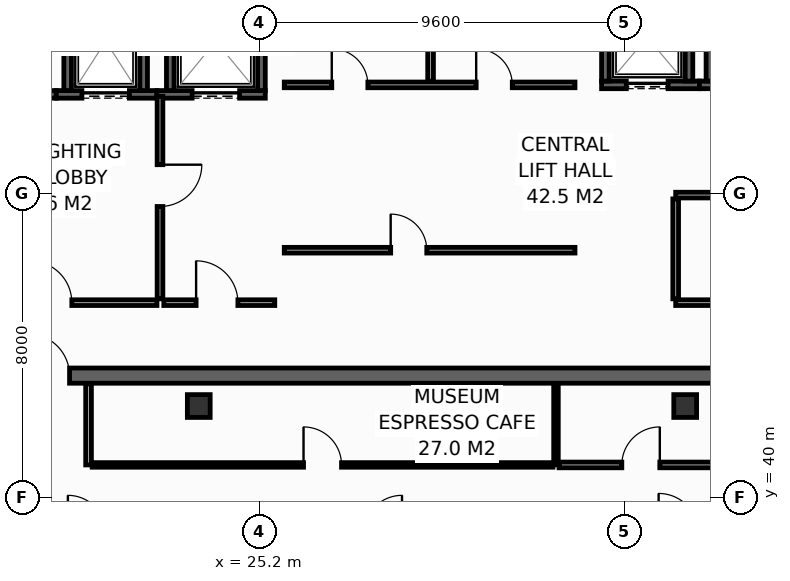
"""IFC4 building model, lengths in metres.
Left out: names, types, materials, properties, quantities, classifications, styles, units other than length and angle.
Written with IfcOpenShell. Run it as: python <this file> out.ifc"""

import sys

from ifc_helpers import new_model, si_unit, direction, frame, frame_2d, origin, origin_2d, place, context, subcontext, project, spatial, rectangle, hollow_rectangle, extrude, element, fill, save


model = new_model("IFC4")
c1 = context("Model", 3, precision=1e-05, world=origin(), true_north=direction((0.0, 1.0)))
c2 = subcontext(c1, "Body", "Model", "MODEL_VIEW")
j1 = project(units=[si_unit("LENGTHUNIT", "METRE"), si_unit("PLANEANGLEUNIT", "RADIAN")], contexts=[c1])
p1 = place(None, origin())
s1 = spatial("IfcSite", under=j1, at=p1, CompositionType="ELEMENT")
p2 = place(p1, origin())
s2 = spatial("IfcBuilding", under=s1, at=p2, CompositionType="ELEMENT")
p3 = place(p2, frame((0.0, 0.0, 261.0)))
s3 = spatial("IfcBuildingStorey", under=s2, at=p3, CompositionType="ELEMENT", Elevation=261.0)
p4 = place(p3, frame((13.7, 43.2, 0.0), z_axis=(0.0, 0.0, 1.0), x_axis=(1.0, 0.0, 0.0)))
e1 = element("IfcWall", 1, at=p4, inside=s3, PredefinedType="SHEAR", context=c2, shape_type="SweptSolid", body=[
    extrude(rectangle(XDim=32.5, YDim=0.4, at=frame_2d((16.25, 0.0))), origin(), (0.0, 0.0, 1.0), 3.55),
])
p5 = place(p4, frame((5.4, 0.0, 0.0)))
e2 = element("IfcOpeningElement", 2, at=p5, cuts=e1, PredefinedType="OPENING", context=c2, shape_type="SweptSolid", body=[
    extrude(rectangle(XDim=1.1, YDim=2.15, at=frame_2d((0.55, 1.075))), frame((0.0, 0.21, 0.0), z_axis=(0.0, -1.0, 0.0), x_axis=(1.0, 0.0, 0.0)), (0.0, 0.0, 1.0), 0.42),
])
p6 = place(p4, frame((25.6, 0.0, 0.0)))
e3 = element("IfcOpeningElement", 3, at=p6, cuts=e1, PredefinedType="OPENING", context=c2, shape_type="SweptSolid", body=[
    extrude(rectangle(XDim=1.1, YDim=2.15, at=frame_2d((0.55, 1.075))), frame((0.0, 0.21, 0.0), z_axis=(0.0, -1.0, 0.0), x_axis=(1.0, 0.0, 0.0)), (0.0, 0.0, 1.0), 0.42),
])
for number, where, z_axis, x_axis in (
    (4, (23.6, 42.4, 0.0), (0.0, 0.0, 1.0), (1.0, 0.0, 0.0)),
    (5, (36.4, 42.4, 0.0), (0.0, 0.0, 1.0), (1.0, 0.0, 0.0)),
):
    element("IfcColumn", number, at=place(p3, frame(where, z_axis=z_axis, x_axis=x_axis)), inside=s3, PredefinedType="COLUMN", context=c2, shape_type="SweptSolid", body=[
        extrude(hollow_rectangle(XDim=0.6, YDim=0.6, WallThickness=0.028, at=origin_2d()), origin(), (0.0, 0.0, 1.0), 3.8),
    ])
p7 = place(p3, frame((17.33, 50.6, 0.0), z_axis=(0.0, 0.0, 1.0), x_axis=(1.0, 0.0, 0.0)))
e6 = element("IfcWall", 6, at=p7, inside=s3, PredefinedType="SHEAR", context=c2, shape_type="SweptSolid", body=[
    extrude(rectangle(XDim=2.52, YDim=0.2, at=frame_2d((1.26, 0.0))), origin(), (0.0, 0.0, 1.0), 3.55),
])
p8 = place(p7, frame((0.595, 0.0, 0.0)))
e7 = element("IfcOpeningElement", 7, at=p8, cuts=e6, PredefinedType="OPENING", context=c2, shape_type="SweptSolid", body=[
    extrude(rectangle(XDim=1.25, YDim=2.3, at=frame_2d((0.625, 1.15))), frame((0.0, 0.11, 0.0), z_axis=(0.0, -1.0, 0.0), x_axis=(1.0, 0.0, 0.0)), (0.0, 0.0, 1.0), 0.22),
])
p9 = place(p3, frame((19.85, 50.6, 0.0), z_axis=(0.0, 0.0, 1.0), x_axis=(1.0, 0.0, 0.0)))
e8 = element("IfcWall", 8, at=p9, inside=s3, PredefinedType="SHEAR", context=c2, shape_type="SweptSolid", body=[
    extrude(rectangle(XDim=2.65, YDim=0.2, at=frame_2d((1.325, 0.0))), origin(), (0.0, 0.0, 1.0), 3.55),
])
p10 = place(p9, frame((0.675, 0.0, 0.0)))
e9 = element("IfcOpeningElement", 9, at=p10, cuts=e8, PredefinedType="OPENING", context=c2, shape_type="SweptSolid", body=[
    extrude(rectangle(XDim=1.25, YDim=2.3, at=frame_2d((0.625, 1.15))), frame((0.0, 0.11, 0.0), z_axis=(0.0, -1.0, 0.0), x_axis=(1.0, 0.0, 0.0)), (0.0, 0.0, 1.0), 0.22),
])
for number, where, z_axis, x_axis in (
    (10, (20.15, 50.7, 0.0), (0.0, 0.0, 1.0), (0.0, 1.0, 0.0)),
    (11, (22.15, 50.7, 0.0), (0.0, 0.0, 1.0), (0.0, 1.0, 0.0)),
):
    element("IfcWall", number, at=place(p3, frame(where, z_axis=z_axis, x_axis=x_axis)), inside=s3, PredefinedType="SHEAR", context=c2, shape_type="SweptSolid", body=[
        extrude(rectangle(XDim=2.6, YDim=0.2, at=frame_2d((1.3, 0.0))), origin(), (0.0, 0.0, 1.0), 3.55),
    ])
p11 = place(p3, frame((22.5, 50.6, 0.0), z_axis=(0.0, 0.0, 1.0), x_axis=(1.0, 0.0, 0.0)))
e12 = element("IfcWall", 12, at=p11, inside=s3, PredefinedType="SHEAR", context=c2, shape_type="SweptSolid", body=[
    extrude(rectangle(XDim=2.85, YDim=0.2, at=frame_2d((1.425, 0.0))), origin(), (0.0, 0.0, 1.0), 3.55),
])
p12 = place(p11, frame((0.925, 0.0, 0.0)))
e13 = element("IfcOpeningElement", 13, at=p12, cuts=e12, PredefinedType="OPENING", context=c2, shape_type="SweptSolid", body=[
    extrude(rectangle(XDim=1.25, YDim=2.3, at=frame_2d((0.625, 1.15))), frame((0.0, 0.11, 0.0), z_axis=(0.0, -1.0, 0.0), x_axis=(1.0, 0.0, 0.0)), (0.0, 0.0, 1.0), 0.22),
])
for number, where, z_axis, x_axis in (
    (14, (22.85, 50.7, 0.0), (0.0, 0.0, 1.0), (0.0, 1.0, 0.0)),
    (15, (25.25, 50.7, 0.0), (0.0, 0.0, 1.0), (0.0, 1.0, 0.0)),
):
    element("IfcWall", number, at=place(p3, frame(where, z_axis=z_axis, x_axis=x_axis)), inside=s3, PredefinedType="SHEAR", context=c2, shape_type="SweptSolid", body=[
        extrude(rectangle(XDim=2.6, YDim=0.2, at=frame_2d((1.3, 0.0))), origin(), (0.0, 0.0, 1.0), 3.55),
    ])
p13 = place(p3, frame((34.2, 50.85, 0.0), z_axis=(0.0, 0.0, 1.0), x_axis=(1.0, 0.0, 0.0)))
e16 = element("IfcWall", 16, at=p13, inside=s3, PredefinedType="SHEAR", context=c2, shape_type="SweptSolid", body=[
    extrude(rectangle(XDim=2.575, YDim=0.2, at=frame_2d((1.288, 0.0))), origin(), (0.0, 0.0, 1.0), 3.55),
])
p14 = place(p13, frame((0.65, 0.0, 0.0)))
e17 = element("IfcOpeningElement", 17, at=p14, cuts=e16, PredefinedType="OPENING", context=c2, shape_type="SweptSolid", body=[
    extrude(rectangle(XDim=1.1, YDim=2.2, at=frame_2d((0.55, 1.1))), frame((0.0, 0.11, 0.0), z_axis=(0.0, -1.0, 0.0), x_axis=(1.0, 0.0, 0.0)), (0.0, 0.0, 1.0), 0.22),
])
for number, where, z_axis, x_axis in (
    (18, (34.3, 50.95, 0.0), (0.0, 0.0, 1.0), (0.0, 1.0, 0.0)),
    (19, (36.5, 50.95, 0.0), (0.0, 0.0, 1.0), (0.0, 1.0, 0.0)),
):
    element("IfcWall", number, at=place(p3, frame(where, z_axis=z_axis, x_axis=x_axis)), inside=s3, PredefinedType="SHEAR", context=c2, shape_type="SweptSolid", body=[
        extrude(rectangle(XDim=2.3, YDim=0.2, at=frame_2d((1.15, 0.0))), origin(), (0.0, 0.0, 1.0), 3.55),
    ])
p15 = place(p3, frame((36.775, 50.85, 0.0), z_axis=(0.0, 0.0, 1.0), x_axis=(1.0, 0.0, 0.0)))
e20 = element("IfcWall", 20, at=p15, inside=s3, PredefinedType="SHEAR", context=c2, shape_type="SweptSolid", body=[
    extrude(rectangle(XDim=2.75, YDim=0.2, at=frame_2d((1.375, 0.0))), origin(), (0.0, 0.0, 1.0), 3.55),
])
p16 = place(p15, frame((0.825, 0.0, 0.0)))
e21 = element("IfcOpeningElement", 21, at=p16, cuts=e20, PredefinedType="OPENING", context=c2, shape_type="SweptSolid", body=[
    extrude(rectangle(XDim=1.1, YDim=2.2, at=frame_2d((0.55, 1.1))), frame((0.0, 0.11, 0.0), z_axis=(0.0, -1.0, 0.0), x_axis=(1.0, 0.0, 0.0)), (0.0, 0.0, 1.0), 0.22),
])
p17 = place(p3, frame((37.05, 50.95, 0.0), z_axis=(0.0, 0.0, 1.0), x_axis=(0.0, 1.0, 0.0)))
e22 = element("IfcWall", 22, at=p17, inside=s3, PredefinedType="SHEAR", context=c2, shape_type="SweptSolid", body=[
    extrude(rectangle(XDim=2.3, YDim=0.2, at=frame_2d((1.15, 0.0))), origin(), (0.0, 0.0, 1.0), 3.55),
])
p18 = place(p3, frame((17.36, 45.12, 0.0), z_axis=(0.0, 0.0, 1.0), x_axis=(1.0, 0.0, 0.0)))
e23 = element("IfcWall", 23, at=p18, inside=s3, PredefinedType="PARTITIONING", context=c2, shape_type="SweptSolid", body=[
    extrude(rectangle(XDim=5.14, YDim=0.15, at=frame_2d((2.57, 0.0))), origin(), (0.0, 0.0, 1.0), 3.55),
])
p19 = place(p18, frame((1.8, 0.0, 0.0)))
e24 = element("IfcOpeningElement", 24, at=p19, cuts=e23, PredefinedType="OPENING", context=c2, shape_type="SweptSolid", body=[
    extrude(rectangle(XDim=1.1, YDim=2.15, at=frame_2d((0.55, 1.075))), frame((0.0, 0.085, 0.0), z_axis=(0.0, -1.0, 0.0), x_axis=(1.0, 0.0, 0.0)), (0.0, 0.0, 1.0), 0.17),
])
p20 = place(p3, frame((22.58, 50.55, 0.0), z_axis=(0.0, 0.0, 1.0), x_axis=(0.0, -1.0, 0.0)))
e25 = element("IfcWall", 25, at=p20, inside=s3, PredefinedType="PARTITIONING", context=c2, shape_type="SweptSolid", body=[
    extrude(rectangle(XDim=5.33, YDim=0.15, at=frame_2d((2.665, 0.0))), origin(), (0.0, 0.0, 1.0), 3.55),
])
p21 = place(p20, frame((1.8, 0.0, 0.0)))
e26 = element("IfcOpeningElement", 26, at=p21, cuts=e25, PredefinedType="OPENING", context=c2, shape_type="SweptSolid", body=[
    extrude(rectangle(XDim=1.1, YDim=2.15, at=frame_2d((0.55, 1.075))), frame((0.0, 0.085, 0.0), z_axis=(0.0, -1.0, 0.0), x_axis=(1.0, 0.0, 0.0)), (0.0, 0.0, 1.0), 0.17),
])
p22 = place(p3, frame((22.68, 45.12, 0.0), z_axis=(0.0, 0.0, 1.0), x_axis=(1.0, 0.0, 0.0)))
e27 = element("IfcWall", 27, at=p22, inside=s3, PredefinedType="PARTITIONING", context=c2, shape_type="SweptSolid", body=[
    extrude(rectangle(XDim=2.92, YDim=0.15, at=frame_2d((1.46, 0.0))), origin(), (0.0, 0.0, 1.0), 3.55),
])
p23 = place(p22, frame((0.85, 0.0, 0.0)))
e28 = element("IfcOpeningElement", 28, at=p23, cuts=e27, PredefinedType="OPENING", context=c2, shape_type="SweptSolid", body=[
    extrude(rectangle(XDim=1.1, YDim=2.15, at=frame_2d((0.55, 1.075))), frame((0.0, 0.085, 0.0), z_axis=(0.0, -1.0, 0.0), x_axis=(1.0, 0.0, 0.0)), (0.0, 0.0, 1.0), 0.17),
])
p24 = place(p3, frame((36.15, 45.12, 0.0), z_axis=(0.0, 0.0, 1.0), x_axis=(1.0, 0.0, 0.0)))
e29 = element("IfcWall", 29, at=p24, inside=s3, PredefinedType="PARTITIONING", context=c2, shape_type="SweptSolid", body=[
    extrude(rectangle(XDim=6.35, YDim=0.15, at=frame_2d((3.175, 0.0))), origin(), (0.0, 0.0, 1.0), 3.55),
])
p25 = place(p24, frame((1.05, 0.0, 0.0)))
e30 = element("IfcOpeningElement", 30, at=p25, cuts=e29, PredefinedType="OPENING", context=c2, shape_type="SweptSolid", body=[
    extrude(rectangle(XDim=0.95, YDim=2.15, at=frame_2d((0.475, 1.075))), frame((0.0, 0.085, 0.0), z_axis=(0.0, -1.0, 0.0), x_axis=(1.0, 0.0, 0.0)), (0.0, 0.0, 1.0), 0.17),
])
p26 = place(p24, frame((4.25, 0.0, 0.0)))
e31 = element("IfcOpeningElement", 31, at=p26, cuts=e29, PredefinedType="OPENING", context=c2, shape_type="SweptSolid", body=[
    extrude(rectangle(XDim=0.95, YDim=2.15, at=frame_2d((0.475, 1.075))), frame((0.0, 0.085, 0.0), z_axis=(0.0, -1.0, 0.0), x_axis=(1.0, 0.0, 0.0)), (0.0, 0.0, 1.0), 0.17),
])
p27 = place(p3, frame((36.15, 47.95, 0.0), z_axis=(0.0, 0.0, 1.0), x_axis=(1.0, 0.0, 0.0)))
e32 = element("IfcWall", 32, at=p27, inside=s3, PredefinedType="PARTITIONING", context=c2, shape_type="SweptSolid", body=[
    extrude(rectangle(XDim=6.35, YDim=0.15, at=frame_2d((3.175, 0.0))), origin(), (0.0, 0.0, 1.0), 3.55),
])
p28 = place(p3, frame((36.15, 45.22, 0.0), z_axis=(0.0, 0.0, 1.0), x_axis=(0.0, 1.0, 0.0)))
e33 = element("IfcWall", 33, at=p28, inside=s3, PredefinedType="PARTITIONING", context=c2, shape_type="SweptSolid", body=[
    extrude(rectangle(XDim=2.63, YDim=0.15, at=frame_2d((1.315, 0.0))), origin(), (0.0, 0.0, 1.0), 3.55),
])
p29 = place(p3, frame((25.85, 50.85, 0.0), z_axis=(0.0, 0.0, 1.0), x_axis=(1.0, 0.0, 0.0)))
e34 = element("IfcWall", 34, at=p29, inside=s3, PredefinedType="PARTITIONING", context=c2, shape_type="SweptSolid", body=[
    extrude(rectangle(XDim=7.65, YDim=0.15, at=frame_2d((3.825, 0.0))), origin(), (0.0, 0.0, 1.0), 3.55),
])
p30 = place(p29, frame((1.25, 0.0, 0.0)))
e35 = element("IfcOpeningElement", 35, at=p30, cuts=e34, PredefinedType="OPENING", context=c2, shape_type="SweptSolid", body=[
    extrude(rectangle(XDim=0.95, YDim=2.15, at=frame_2d((0.475, 1.075))), frame((0.0, 0.085, 0.0), z_axis=(0.0, -1.0, 0.0), x_axis=(1.0, 0.0, 0.0)), (0.0, 0.0, 1.0), 0.17),
])
p31 = place(p29, frame((5.05, 0.0, 0.0)))
e36 = element("IfcOpeningElement", 36, at=p31, cuts=e34, PredefinedType="OPENING", context=c2, shape_type="SweptSolid", body=[
    extrude(rectangle(XDim=0.95, YDim=2.15, at=frame_2d((0.475, 1.075))), frame((0.0, 0.085, 0.0), z_axis=(0.0, -1.0, 0.0), x_axis=(1.0, 0.0, 0.0)), (0.0, 0.0, 1.0), 0.17),
])
p32 = place(p3, frame((29.7, 50.95, 0.0), z_axis=(0.0, 0.0, 1.0), x_axis=(0.0, 1.0, 0.0)))
e37 = element("IfcWall", 37, at=p32, inside=s3, PredefinedType="PARTITIONING", context=c2, shape_type="SweptSolid", body=[
    extrude(rectangle(XDim=2.7, YDim=0.15, at=frame_2d((1.35, 0.0))), origin(), (0.0, 0.0, 1.0), 3.55),
])
p33 = place(p3, frame((25.85, 46.5, 0.0), z_axis=(0.0, 0.0, 1.0), x_axis=(1.0, 0.0, 0.0)))
e38 = element("IfcWall", 38, at=p33, inside=s3, PredefinedType="PARTITIONING", context=c2, shape_type="SweptSolid", body=[
    extrude(rectangle(XDim=7.65, YDim=0.15, at=frame_2d((3.825, 0.0))), origin(), (0.0, 0.0, 1.0), 3.55),
])
p34 = place(p33, frame((2.8, 0.0, 0.0)))
e39 = element("IfcOpeningElement", 39, at=p34, cuts=e38, PredefinedType="OPENING", context=c2, shape_type="SweptSolid", body=[
    extrude(rectangle(XDim=0.95, YDim=2.15, at=frame_2d((0.475, 1.075))), frame((0.0, 0.085, 0.0), z_axis=(0.0, -1.0, 0.0), x_axis=(1.0, 0.0, 0.0)), (0.0, 0.0, 1.0), 0.17),
])
p35 = place(p3, frame((20.7, 40.85, 0.0), z_axis=(0.0, 0.0, 1.0), x_axis=(0.0, 1.0, 0.0)))
e40 = element("IfcWall", 40, at=p35, inside=s3, PredefinedType="PARTITIONING", context=c2, shape_type="SweptSolid", body=[
    extrude(rectangle(XDim=2.13, YDim=0.15, at=frame_2d((1.065, 0.0))), origin(), (0.0, 0.0, 1.0), 3.55),
])
p36 = place(p3, frame((33.0, 40.85, 0.0), z_axis=(0.0, 0.0, 1.0), x_axis=(0.0, 1.0, 0.0)))
e41 = element("IfcWall", 41, at=p36, inside=s3, PredefinedType="PARTITIONING", context=c2, shape_type="SweptSolid", body=[
    extrude(rectangle(XDim=2.13, YDim=0.12, at=frame_2d((1.065, 0.0))), origin(), (0.0, 0.0, 1.0), 2.947),
])
p37 = place(p3, frame((20.795, 40.85, 0.0), z_axis=(0.0, 0.0, 1.0), x_axis=(1.0, 0.0, 0.0)))
e42 = element("IfcWall", 42, at=p37, inside=s3, PredefinedType="PARTITIONING", context=c2, shape_type="SweptSolid", body=[
    extrude(rectangle(XDim=12.125, YDim=0.12, at=frame_2d((6.062, 0.0))), origin(), (0.0, 0.0, 1.0), 2.947),
])
p38 = place(p37, frame((5.562, 0.0, 0.0)))
e43 = element("IfcOpeningElement", 43, at=p38, cuts=e42, PredefinedType="OPENING", context=c2, shape_type="SweptSolid", body=[
    extrude(rectangle(XDim=1.0, YDim=2.15, at=frame_2d((0.5, 1.075))), frame((0.0, 0.07, 0.0), z_axis=(0.0, -1.0, 0.0), x_axis=(1.0, 0.0, 0.0)), (0.0, 0.0, 1.0), 0.14),
])
p39 = place(p3, frame((33.08, 40.85, 0.0), z_axis=(0.0, 0.0, 1.0), x_axis=(1.0, 0.0, 0.0)))
e44 = element("IfcWall", 44, at=p39, inside=s3, PredefinedType="PARTITIONING", context=c2, shape_type="SweptSolid", body=[
    extrude(rectangle(XDim=5.625, YDim=0.15, at=frame_2d((2.812, 0.0))), origin(), (0.0, 0.0, 1.0), 2.947),
])
p40 = place(p39, frame((1.652, 0.0, 0.0)))
e45 = element("IfcOpeningElement", 45, at=p40, cuts=e44, PredefinedType="OPENING", context=c2, shape_type="SweptSolid", body=[
    extrude(rectangle(XDim=1.0, YDim=2.15, at=frame_2d((0.5, 1.075))), frame((0.0, 0.085, 0.0), z_axis=(0.0, -1.0, 0.0), x_axis=(1.0, 0.0, 0.0)), (0.0, 0.0, 1.0), 0.17),
])
p41 = place(p10, origin())
e46 = element("IfcDoor", 46, at=p41, inside=s3, OperationType="SLIDING_TO_LEFT", PredefinedType="DOOR", context=c2, shape_type="SweptSolid", body=[
    extrude(rectangle(XDim=1.25, YDim=2.3, at=frame_2d((0.625, 1.15))), frame((0.0, 0.025, 0.0), z_axis=(0.0, -1.0, 0.0), x_axis=(1.0, 0.0, 0.0)), (0.0, 0.0, 1.0), 0.05),
])
fill(e9, e46)
p42 = place(p12, origin())
e47 = element("IfcDoor", 47, at=p42, inside=s3, OperationType="SLIDING_TO_LEFT", PredefinedType="DOOR", context=c2, shape_type="SweptSolid", body=[
    extrude(rectangle(XDim=1.25, YDim=2.3, at=frame_2d((0.625, 1.15))), frame((0.0, 0.025, 0.0), z_axis=(0.0, -1.0, 0.0), x_axis=(1.0, 0.0, 0.0)), (0.0, 0.0, 1.0), 0.05),
])
fill(e13, e47)
p43 = place(p14, origin())
e48 = element("IfcDoor", 48, at=p43, inside=s3, OperationType="SLIDING_TO_LEFT", PredefinedType="DOOR", context=c2, shape_type="SweptSolid", body=[
    extrude(rectangle(XDim=1.1, YDim=2.2, at=frame_2d((0.55, 1.1))), frame((0.0, 0.025, 0.0), z_axis=(0.0, -1.0, 0.0), x_axis=(1.0, 0.0, 0.0)), (0.0, 0.0, 1.0), 0.05),
])
fill(e17, e48)
p44 = place(p19, origin())
e49 = element("IfcDoor", 49, at=p44, inside=s3, OperationType="SINGLE_SWING_LEFT", PredefinedType="DOOR", context=c2, shape_type="SweptSolid", body=[
    extrude(rectangle(XDim=1.1, YDim=2.15, at=frame_2d((0.55, 1.075))), frame((0.0, 0.025, 0.0), z_axis=(0.0, -1.0, 0.0), x_axis=(1.0, 0.0, 0.0)), (0.0, 0.0, 1.0), 0.05),
])
fill(e24, e49)
p45 = place(p21, origin())
e50 = element("IfcDoor", 50, at=p45, inside=s3, OperationType="SINGLE_SWING_LEFT", PredefinedType="DOOR", context=c2, shape_type="SweptSolid", body=[
    extrude(rectangle(XDim=1.1, YDim=2.15, at=frame_2d((0.55, 1.075))), frame((0.0, 0.025, 0.0), z_axis=(0.0, -1.0, 0.0), x_axis=(1.0, 0.0, 0.0)), (0.0, 0.0, 1.0), 0.05),
])
fill(e26, e50)
p46 = place(p23, origin())
e51 = element("IfcDoor", 51, at=p46, inside=s3, OperationType="SINGLE_SWING_LEFT", PredefinedType="DOOR", context=c2, shape_type="SweptSolid", body=[
    extrude(rectangle(XDim=1.1, YDim=2.15, at=frame_2d((0.55, 1.075))), frame((0.0, 0.025, 0.0), z_axis=(0.0, -1.0, 0.0), x_axis=(1.0, 0.0, 0.0)), (0.0, 0.0, 1.0), 0.05),
])
fill(e28, e51)
p47 = place(p5, origin())
e52 = element("IfcDoor", 52, at=p47, inside=s3, OperationType="SINGLE_SWING_LEFT", PredefinedType="DOOR", context=c2, shape_type="SweptSolid", body=[
    extrude(rectangle(XDim=1.1, YDim=2.15, at=frame_2d((0.55, 1.075))), frame((0.0, 0.025, 0.0), z_axis=(0.0, -1.0, 0.0), x_axis=(1.0, 0.0, 0.0)), (0.0, 0.0, 1.0), 0.05),
])
fill(e2, e52)
p48 = place(p30, origin())
e53 = element("IfcDoor", 53, at=p48, inside=s3, OperationType="SINGLE_SWING_LEFT", PredefinedType="DOOR", context=c2, shape_type="SweptSolid", body=[
    extrude(rectangle(XDim=0.95, YDim=2.15, at=frame_2d((0.475, 1.075))), frame((0.0, 0.025, 0.0), z_axis=(0.0, -1.0, 0.0), x_axis=(1.0, 0.0, 0.0)), (0.0, 0.0, 1.0), 0.05),
])
fill(e35, e53)
p49 = place(p31, origin())
e54 = element("IfcDoor", 54, at=p49, inside=s3, OperationType="SINGLE_SWING_LEFT", PredefinedType="DOOR", context=c2, shape_type="SweptSolid", body=[
    extrude(rectangle(XDim=0.95, YDim=2.15, at=frame_2d((0.475, 1.075))), frame((0.0, 0.025, 0.0), z_axis=(0.0, -1.0, 0.0), x_axis=(1.0, 0.0, 0.0)), (0.0, 0.0, 1.0), 0.05),
])
fill(e36, e54)
p50 = place(p34, origin())
e55 = element("IfcDoor", 55, at=p50, inside=s3, OperationType="SINGLE_SWING_LEFT", PredefinedType="DOOR", context=c2, shape_type="SweptSolid", body=[
    extrude(rectangle(XDim=0.95, YDim=2.15, at=frame_2d((0.475, 1.075))), frame((0.0, 0.025, 0.0), z_axis=(0.0, -1.0, 0.0), x_axis=(1.0, 0.0, 0.0)), (0.0, 0.0, 1.0), 0.05),
])
fill(e39, e55)
p51 = place(p38, origin())
e56 = element("IfcDoor", 56, at=p51, inside=s3, OperationType="SINGLE_SWING_LEFT", PredefinedType="DOOR", context=c2, shape_type="SweptSolid", body=[
    extrude(rectangle(XDim=1.0, YDim=2.15, at=frame_2d((0.5, 1.075))), frame((0.0, 0.025, 0.0), z_axis=(0.0, -1.0, 0.0), x_axis=(1.0, 0.0, 0.0)), (0.0, 0.0, 1.0), 0.05),
])
fill(e43, e56)
p52 = place(p40, origin())
e57 = element("IfcDoor", 57, at=p52, inside=s3, OperationType="SINGLE_SWING_RIGHT", PredefinedType="DOOR", context=c2, shape_type="SweptSolid", body=[
    extrude(rectangle(XDim=1.0, YDim=2.15, at=frame_2d((0.5, 1.075))), frame((0.0, 0.025, 0.0), z_axis=(0.0, -1.0, 0.0), x_axis=(1.0, 0.0, 0.0)), (0.0, 0.0, 1.0), 0.05),
])
fill(e45, e57)
save(model, sys.argv[1])
